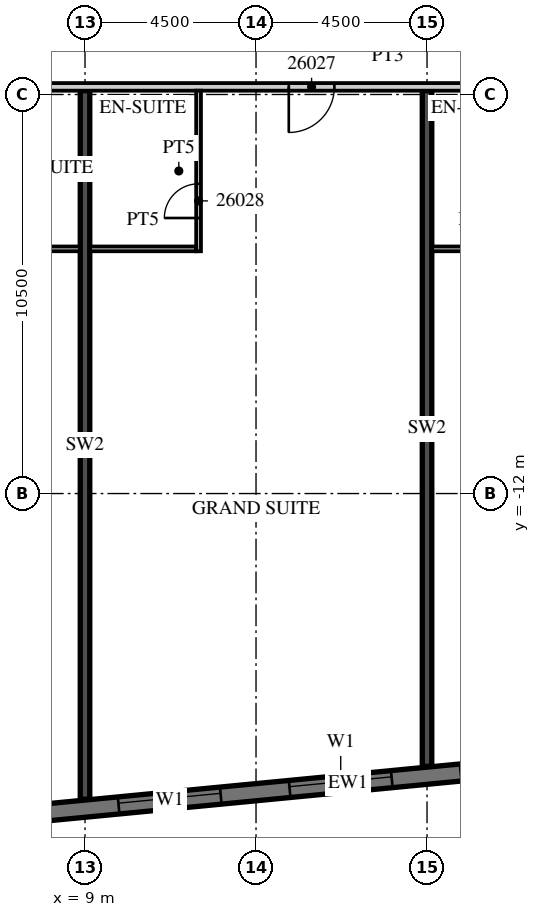
"""IFC4 building model, lengths in metres.
Left out: names, types, materials, properties, quantities, classifications, styles, units other than length and angle.
Written with IfcOpenShell. Run it as: python <this file> out.ifc"""

import sys

from ifc_helpers import new_model, si_unit, direction, frame, frame_2d, origin, place, context, subcontext, project, spatial, rectangle, extrude, element, fill, save


model = new_model("IFC4")
c1 = context("Model", 3, precision=1e-05, world=origin(), true_north=direction((0.0, 1.0)))
c2 = subcontext(c1, "Body", "Model", "MODEL_VIEW")
j1 = project(units=[si_unit("LENGTHUNIT", "METRE"), si_unit("PLANEANGLEUNIT", "RADIAN")], contexts=[c1])
p1 = place(None, origin())
s1 = spatial("IfcSite", under=j1, at=p1, CompositionType="ELEMENT")
p2 = place(p1, origin())
s2 = spatial("IfcBuilding", under=s1, at=p2, CompositionType="ELEMENT")
p3 = place(p2, frame((0.0, 0.0, 120.7)))
s3 = spatial("IfcBuildingStorey", under=s2, at=p3, CompositionType="ELEMENT", Elevation=120.7)
p4 = place(p3, frame((9.0, -20.044, 0.0), z_axis=(0.0, 0.0, 1.0), x_axis=(0.0, 1.0, 0.0)))
e1 = element("IfcWall", 1, at=p4, inside=s3, PredefinedType="SHEAR", context=c2, shape_type="SweptSolid", body=[
    extrude(rectangle(XDim=18.644, YDim=0.25, at=frame_2d((9.322, 0.0))), origin(), (0.0, 0.0, 1.0), 3.3),
])
p5 = place(p3, frame((18.0, -19.177, 0.0), z_axis=(0.0, 0.0, 1.0), x_axis=(0.0, 1.0, 0.0)))
e2 = element("IfcWall", 2, at=p5, inside=s3, PredefinedType="SHEAR", context=c2, shape_type="SweptSolid", body=[
    extrude(rectangle(XDim=17.777, YDim=0.25, at=frame_2d((8.889, 0.0))), origin(), (0.0, 0.0, 1.0), 3.3),
])
p6 = place(p3, frame((-13.521, -22.46, 0.0), z_axis=(0.0, 0.0, 1.0), x_axis=(0.995396096335, 0.095846812164, 0.0)))
e3 = element("IfcWall", 3, at=p6, inside=s3, PredefinedType="SOLIDWALL", context=c2, shape_type="SweptSolid", body=[
    extrude(rectangle(XDim=59.151, YDim=0.45, at=frame_2d((29.575, 0.0))), origin(), (0.0, 0.0, 1.0), 3.02),
])
p7 = place(p6, frame((0.91, 0.0, 0.45)))
e4 = element("IfcOpeningElement", 4, at=p7, cuts=e3, PredefinedType="OPENING", context=c2, shape_type="SweptSolid", body=[
    extrude(rectangle(XDim=2.7, YDim=2.25, at=frame_2d((1.35, 1.125))), frame((0.0, 0.235, 0.0), z_axis=(0.0, -1.0, 0.0), x_axis=(1.0, 0.0, 0.0)), (0.0, 0.0, 1.0), 0.47),
])
p8 = place(p6, frame((5.431, 0.0, 0.45)))
e5 = element("IfcOpeningElement", 5, at=p8, cuts=e3, PredefinedType="OPENING", context=c2, shape_type="SweptSolid", body=[
    extrude(rectangle(XDim=2.7, YDim=2.25, at=frame_2d((1.35, 1.125))), frame((0.0, 0.235, 0.0), z_axis=(0.0, -1.0, 0.0), x_axis=(1.0, 0.0, 0.0)), (0.0, 0.0, 1.0), 0.47),
])
p9 = place(p6, frame((9.952, 0.0, 0.45)))
e6 = element("IfcOpeningElement", 6, at=p9, cuts=e3, PredefinedType="OPENING", context=c2, shape_type="SweptSolid", body=[
    extrude(rectangle(XDim=2.7, YDim=2.25, at=frame_2d((1.35, 1.125))), frame((0.0, 0.235, 0.0), z_axis=(0.0, -1.0, 0.0), x_axis=(1.0, 0.0, 0.0)), (0.0, 0.0, 1.0), 0.47),
])
p10 = place(p6, frame((14.473, 0.0, 0.45)))
e7 = element("IfcOpeningElement", 7, at=p10, cuts=e3, PredefinedType="OPENING", context=c2, shape_type="SweptSolid", body=[
    extrude(rectangle(XDim=2.7, YDim=2.25, at=frame_2d((1.35, 1.125))), frame((0.0, 0.235, 0.0), z_axis=(0.0, -1.0, 0.0), x_axis=(1.0, 0.0, 0.0)), (0.0, 0.0, 1.0), 0.47),
])
p11 = place(p6, frame((18.994, 0.0, 0.45)))
e8 = element("IfcOpeningElement", 8, at=p11, cuts=e3, PredefinedType="OPENING", context=c2, shape_type="SweptSolid", body=[
    extrude(rectangle(XDim=2.7, YDim=2.25, at=frame_2d((1.35, 1.125))), frame((0.0, 0.235, 0.0), z_axis=(0.0, -1.0, 0.0), x_axis=(1.0, 0.0, 0.0)), (0.0, 0.0, 1.0), 0.47),
])
p12 = place(p6, frame((23.514, 0.0, 0.45)))
e9 = element("IfcOpeningElement", 9, at=p12, cuts=e3, PredefinedType="OPENING", context=c2, shape_type="SweptSolid", body=[
    extrude(rectangle(XDim=2.7, YDim=2.25, at=frame_2d((1.35, 1.125))), frame((0.0, 0.235, 0.0), z_axis=(0.0, -1.0, 0.0), x_axis=(1.0, 0.0, 0.0)), (0.0, 0.0, 1.0), 0.47),
])
p13 = place(p6, frame((28.035, 0.0, 0.45)))
e10 = element("IfcOpeningElement", 10, at=p13, cuts=e3, PredefinedType="OPENING", context=c2, shape_type="SweptSolid", body=[
    extrude(rectangle(XDim=2.7, YDim=2.25, at=frame_2d((1.35, 1.125))), frame((0.0, 0.235, 0.0), z_axis=(0.0, -1.0, 0.0), x_axis=(1.0, 0.0, 0.0)), (0.0, 0.0, 1.0), 0.47),
])
p14 = place(p6, frame((32.556, 0.0, 0.45)))
e11 = element("IfcOpeningElement", 11, at=p14, cuts=e3, PredefinedType="OPENING", context=c2, shape_type="SweptSolid", body=[
    extrude(rectangle(XDim=2.7, YDim=2.25, at=frame_2d((1.35, 1.125))), frame((0.0, 0.235, 0.0), z_axis=(0.0, -1.0, 0.0), x_axis=(1.0, 0.0, 0.0)), (0.0, 0.0, 1.0), 0.47),
])
p15 = place(p6, frame((37.077, 0.0, 0.45)))
e12 = element("IfcOpeningElement", 12, at=p15, cuts=e3, PredefinedType="OPENING", context=c2, shape_type="SweptSolid", body=[
    extrude(rectangle(XDim=2.7, YDim=2.25, at=frame_2d((1.35, 1.125))), frame((0.0, 0.235, 0.0), z_axis=(0.0, -1.0, 0.0), x_axis=(1.0, 0.0, 0.0)), (0.0, 0.0, 1.0), 0.47),
])
p16 = place(p6, frame((41.598, 0.0, 0.45)))
e13 = element("IfcOpeningElement", 13, at=p16, cuts=e3, PredefinedType="OPENING", context=c2, shape_type="SweptSolid", body=[
    extrude(rectangle(XDim=2.7, YDim=2.25, at=frame_2d((1.35, 1.125))), frame((0.0, 0.235, 0.0), z_axis=(0.0, -1.0, 0.0), x_axis=(1.0, 0.0, 0.0)), (0.0, 0.0, 1.0), 0.47),
])
p17 = place(p6, frame((46.118, 0.0, 0.45)))
e14 = element("IfcOpeningElement", 14, at=p17, cuts=e3, PredefinedType="OPENING", context=c2, shape_type="SweptSolid", body=[
    extrude(rectangle(XDim=2.7, YDim=2.25, at=frame_2d((1.35, 1.125))), frame((0.0, 0.235, 0.0), z_axis=(0.0, -1.0, 0.0), x_axis=(1.0, 0.0, 0.0)), (0.0, 0.0, 1.0), 0.47),
])
p18 = place(p6, frame((50.639, 0.0, 0.45)))
e15 = element("IfcOpeningElement", 15, at=p18, cuts=e3, PredefinedType="OPENING", context=c2, shape_type="SweptSolid", body=[
    extrude(rectangle(XDim=2.7, YDim=2.25, at=frame_2d((1.35, 1.125))), frame((0.0, 0.235, 0.0), z_axis=(0.0, -1.0, 0.0), x_axis=(1.0, 0.0, 0.0)), (0.0, 0.0, 1.0), 0.47),
])
p19 = place(p6, frame((55.15, 0.0, 0.45)))
e16 = element("IfcOpeningElement", 16, at=p19, cuts=e3, PredefinedType="OPENING", context=c2, shape_type="SweptSolid", body=[
    extrude(rectangle(XDim=2.7, YDim=2.25, at=frame_2d((1.35, 1.125))), frame((0.0, 0.235, 0.0), z_axis=(0.0, -1.0, 0.0), x_axis=(1.0, 0.0, 0.0)), (0.0, 0.0, 1.0), 0.47),
])
p20 = place(p3, frame((-13.5, -1.3, 0.0), z_axis=(0.0, 0.0, 1.0), x_axis=(1.0, 0.0, 0.0)))
e17 = element("IfcWall", 17, at=p20, inside=s3, PredefinedType="PARTITIONING", context=c2, shape_type="SweptSolid", body=[
    extrude(rectangle(XDim=60.932, YDim=0.2, at=frame_2d((30.466, 0.0))), origin(), (0.0, 0.0, 1.0), 3.02),
])
p21 = place(p20, frame((2.925, 0.0, 0.0)))
e18 = element("IfcOpeningElement", 18, at=p21, cuts=e17, PredefinedType="OPENING", context=c2, shape_type="SweptSolid", body=[
    extrude(rectangle(XDim=1.0, YDim=2.1, at=frame_2d((0.5, 1.05))), frame((0.0, 0.11, 0.0), z_axis=(0.0, -1.0, 0.0), x_axis=(1.0, 0.0, 0.0)), (0.0, 0.0, 1.0), 0.22),
])
p22 = place(p20, frame((9.863, 0.0, 0.0)))
e19 = element("IfcOpeningElement", 19, at=p22, cuts=e17, PredefinedType="OPENING", context=c2, shape_type="SweptSolid", body=[
    extrude(rectangle(XDim=1.2, YDim=2.1, at=frame_2d((0.6, 1.05))), frame((0.0, 0.11, 0.0), z_axis=(0.0, -1.0, 0.0), x_axis=(1.0, 0.0, 0.0)), (0.0, 0.0, 1.0), 0.22),
])
p23 = place(p20, frame((15.938, 0.0, 0.0)))
e20 = element("IfcOpeningElement", 20, at=p23, cuts=e17, PredefinedType="OPENING", context=c2, shape_type="SweptSolid", body=[
    extrude(rectangle(XDim=1.2, YDim=2.1, at=frame_2d((0.6, 1.05))), frame((0.0, 0.11, 0.0), z_axis=(0.0, -1.0, 0.0), x_axis=(1.0, 0.0, 0.0)), (0.0, 0.0, 1.0), 0.22),
])
p24 = place(p20, frame((27.862, 0.0, 0.0)))
e21 = element("IfcOpeningElement", 21, at=p24, cuts=e17, PredefinedType="OPENING", context=c2, shape_type="SweptSolid", body=[
    extrude(rectangle(XDim=1.2, YDim=2.1, at=frame_2d((0.6, 1.05))), frame((0.0, 0.11, 0.0), z_axis=(0.0, -1.0, 0.0), x_axis=(1.0, 0.0, 0.0)), (0.0, 0.0, 1.0), 0.22),
])
p25 = place(p20, frame((34.45, 0.0, 0.0)))
e22 = element("IfcOpeningElement", 22, at=p25, cuts=e17, PredefinedType="OPENING", context=c2, shape_type="SweptSolid", body=[
    extrude(rectangle(XDim=1.0, YDim=2.1, at=frame_2d((0.5, 1.05))), frame((0.0, 0.11, 0.0), z_axis=(0.0, -1.0, 0.0), x_axis=(1.0, 0.0, 0.0)), (0.0, 0.0, 1.0), 0.22),
])
p26 = place(p20, frame((36.55, 0.0, 0.0)))
e23 = element("IfcOpeningElement", 23, at=p26, cuts=e17, PredefinedType="OPENING", context=c2, shape_type="SweptSolid", body=[
    extrude(rectangle(XDim=1.0, YDim=2.1, at=frame_2d((0.5, 1.05))), frame((0.0, 0.11, 0.0), z_axis=(0.0, -1.0, 0.0), x_axis=(1.0, 0.0, 0.0)), (0.0, 0.0, 1.0), 0.22),
])
p27 = place(p20, frame((41.075, 0.0, 0.0)))
e24 = element("IfcOpeningElement", 24, at=p27, cuts=e17, PredefinedType="OPENING", context=c2, shape_type="SweptSolid", body=[
    extrude(rectangle(XDim=1.0, YDim=2.1, at=frame_2d((0.5, 1.05))), frame((0.0, 0.11, 0.0), z_axis=(0.0, -1.0, 0.0), x_axis=(1.0, 0.0, 0.0)), (0.0, 0.0, 1.0), 0.22),
])
p28 = place(p20, frame((45.55, 0.0, 0.0)))
e25 = element("IfcOpeningElement", 25, at=p28, cuts=e17, PredefinedType="OPENING", context=c2, shape_type="SweptSolid", body=[
    extrude(rectangle(XDim=1.0, YDim=2.1, at=frame_2d((0.5, 1.05))), frame((0.0, 0.11, 0.0), z_axis=(0.0, -1.0, 0.0), x_axis=(1.0, 0.0, 0.0)), (0.0, 0.0, 1.0), 0.22),
])
p29 = place(p20, frame((50.075, 0.0, 0.0)))
e26 = element("IfcOpeningElement", 26, at=p29, cuts=e17, PredefinedType="OPENING", context=c2, shape_type="SweptSolid", body=[
    extrude(rectangle(XDim=1.0, YDim=2.1, at=frame_2d((0.5, 1.05))), frame((0.0, 0.11, 0.0), z_axis=(0.0, -1.0, 0.0), x_axis=(1.0, 0.0, 0.0)), (0.0, 0.0, 1.0), 0.22),
])
p30 = place(p20, frame((54.575, 0.0, 0.0)))
e27 = element("IfcOpeningElement", 27, at=p30, cuts=e17, PredefinedType="OPENING", context=c2, shape_type="SweptSolid", body=[
    extrude(rectangle(XDim=1.0, YDim=2.1, at=frame_2d((0.5, 1.05))), frame((0.0, 0.11, 0.0), z_axis=(0.0, -1.0, 0.0), x_axis=(1.0, 0.0, 0.0)), (0.0, 0.0, 1.0), 0.22),
])
p31 = place(p20, frame((59.882, 0.0, 0.0)))
e28 = element("IfcOpeningElement", 28, at=p31, cuts=e17, PredefinedType="OPENING", context=c2, shape_type="SweptSolid", body=[
    extrude(rectangle(XDim=0.9, YDim=2.1, at=frame_2d((0.45, 1.05))), frame((0.0, 0.11, 0.0), z_axis=(0.0, -1.0, 0.0), x_axis=(1.0, 0.0, 0.0)), (0.0, 0.0, 1.0), 0.22),
])
p32 = place(p3, frame((6.075, -5.562, 0.0), z_axis=(0.0, 0.0, 1.0), x_axis=(1.0, 0.0, 0.0)))
e29 = element("IfcWall", 29, at=p32, inside=s3, PredefinedType="PARTITIONING", context=c2, shape_type="SweptSolid", body=[
    extrude(rectangle(XDim=2.8, YDim=0.125, at=frame_2d((1.4, 0.0))), origin(), (0.0, 0.0, 1.0), 3.02),
])
p33 = place(p3, frame((11.988, -5.625, 0.0), z_axis=(0.0, 0.0, 1.0), x_axis=(0.0, 1.0, 0.0)))
e30 = element("IfcWall", 30, at=p33, inside=s3, PredefinedType="PARTITIONING", context=c2, shape_type="SweptSolid", body=[
    extrude(rectangle(XDim=4.225, YDim=0.125, at=frame_2d((2.113, 0.0))), origin(), (0.0, 0.0, 1.0), 3.02),
])
p34 = place(p33, frame((0.875, 0.0, 0.0)))
e31 = element("IfcOpeningElement", 31, at=p34, cuts=e30, PredefinedType="OPENING", context=c2, shape_type="SweptSolid", body=[
    extrude(rectangle(XDim=0.9, YDim=2.1, at=frame_2d((0.45, 1.05))), frame((0.0, 0.073, 0.0), z_axis=(0.0, -1.0, 0.0), x_axis=(1.0, 0.0, 0.0)), (0.0, 0.0, 1.0), 0.145),
])
p35 = place(p3, frame((9.125, -5.562, 0.0), z_axis=(0.0, 0.0, 1.0), x_axis=(1.0, 0.0, 0.0)))
e32 = element("IfcWall", 32, at=p35, inside=s3, PredefinedType="PARTITIONING", context=c2, shape_type="SweptSolid", body=[
    extrude(rectangle(XDim=2.8, YDim=0.125, at=frame_2d((1.4, 0.0))), origin(), (0.0, 0.0, 1.0), 3.02),
])
p36 = place(p3, frame((18.125, -5.562, 0.0), z_axis=(0.0, 0.0, 1.0), x_axis=(1.0, 0.0, 0.0)))
e33 = element("IfcWall", 33, at=p36, inside=s3, PredefinedType="PARTITIONING", context=c2, shape_type="SweptSolid", body=[
    extrude(rectangle(XDim=2.25, YDim=0.125, at=frame_2d((1.125, 0.0))), origin(), (0.0, 0.0, 1.0), 3.02),
])
p37 = place(p12, origin())
e34 = element("IfcWindow", 34, at=p37, inside=s3, PartitioningType="SINGLE_PANEL", PredefinedType="WINDOW", context=c2, shape_type="SweptSolid", body=[
    extrude(rectangle(XDim=2.7, YDim=2.25, at=frame_2d((1.35, 1.125))), frame((0.0, 0.09, 0.0), z_axis=(0.0, -1.0, 0.0), x_axis=(1.0, 0.0, 0.0)), (0.0, 0.0, 1.0), 0.06),
])
fill(e9, e34)
p38 = place(p13, origin())
e35 = element("IfcWindow", 35, at=p38, inside=s3, PartitioningType="SINGLE_PANEL", PredefinedType="WINDOW", context=c2, shape_type="SweptSolid", body=[
    extrude(rectangle(XDim=2.7, YDim=2.25, at=frame_2d((1.35, 1.125))), frame((0.0, 0.09, 0.0), z_axis=(0.0, -1.0, 0.0), x_axis=(1.0, 0.0, 0.0)), (0.0, 0.0, 1.0), 0.06),
])
fill(e10, e35)
p39 = place(p24, origin())
e36 = element("IfcDoor", 36, at=p39, inside=s3, OperationType="SINGLE_SWING_LEFT", PredefinedType="DOOR", context=c2, shape_type="SweptSolid", body=[
    extrude(rectangle(XDim=1.2, YDim=2.1, at=frame_2d((0.6, 1.05))), frame((0.0, 0.025, 0.0), z_axis=(0.0, -1.0, 0.0), x_axis=(1.0, 0.0, 0.0)), (0.0, 0.0, 1.0), 0.05),
])
fill(e21, e36)
p40 = place(p34, origin())
e37 = element("IfcDoor", 37, at=p40, inside=s3, OperationType="SINGLE_SWING_LEFT", PredefinedType="DOOR", context=c2, shape_type="SweptSolid", body=[
    extrude(rectangle(XDim=0.9, YDim=2.1, at=frame_2d((0.45, 1.05))), frame((0.0, 0.025, 0.0), z_axis=(0.0, -1.0, 0.0), x_axis=(1.0, 0.0, 0.0)), (0.0, 0.0, 1.0), 0.05),
])
fill(e31, e37)
save(model, sys.argv[1])
